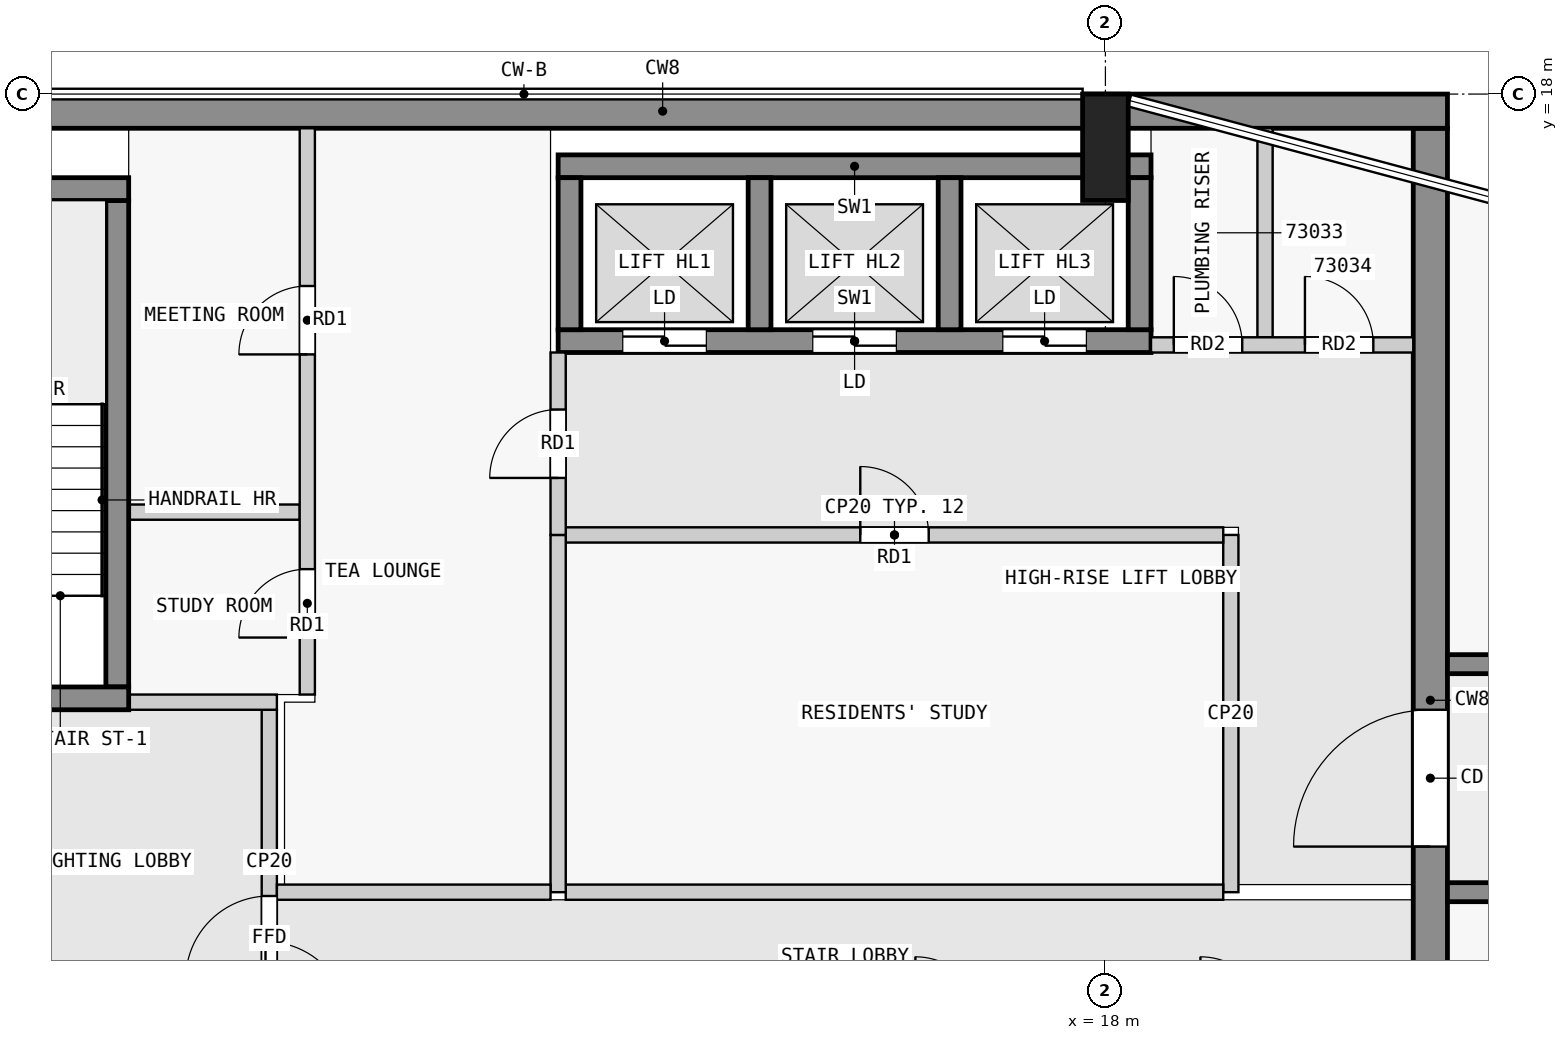
"""IFC4 building model, lengths in metres.
Left out: names, types, materials, properties, quantities, classifications, styles, units other than length and angle.
Written with IfcOpenShell. Run it as: python <this file> out.ifc"""

import sys

from ifc_helpers import new_model, si_unit, direction, frame, frame_2d, origin, origin_2d, place, context, subcontext, project, spatial, rectangle, extrude, element, fill, save


model = new_model("IFC4")
c1 = context("Model", 3, precision=1e-05, world=origin(), true_north=direction((0.0, 1.0)))
c2 = subcontext(c1, "Body", "Model", "MODEL_VIEW")
j1 = project(units=[si_unit("LENGTHUNIT", "METRE"), si_unit("PLANEANGLEUNIT", "RADIAN")], contexts=[c1])
p1 = place(None, origin())
s1 = spatial("IfcSite", under=j1, at=p1, CompositionType="ELEMENT")
p2 = place(p1, origin())
s2 = spatial("IfcBuilding", under=s1, at=p2, CompositionType="ELEMENT")
p3 = place(p2, frame((0.0, 0.0, 277.4)))
s3 = spatial("IfcBuildingStorey", under=s2, at=p3, CompositionType="ELEMENT", Elevation=277.4)
p4 = place(p3, frame((18.0, 17.3, 0.0), z_axis=(0.0, 0.0, 1.0), x_axis=(1.0, 0.0, 0.0)))
e1 = element("IfcColumn", 1, at=p4, inside=s3, PredefinedType="COLUMN", context=c2, shape_type="SweptSolid", body=[
    extrude(rectangle(XDim=0.6, YDim=1.4, at=origin_2d()), origin(), (0.0, 0.0, 1.0), 3.5),
])
p5 = place(p3, frame((1.85, 17.775, 0.0), z_axis=(0.0, 0.0, 1.0), x_axis=(1.0, 0.0, 0.0)))
e2 = element("IfcWall", 2, at=p5, inside=s3, PredefinedType="SHEAR", context=c2, shape_type="SweptSolid", body=[
    extrude(rectangle(XDim=20.65, YDim=0.45, at=frame_2d((10.325, 0.0))), origin(), (0.0, 0.0, 1.0), 3.25),
])
p6 = place(p3, frame((22.275, 2.5, 0.0), z_axis=(0.0, 0.0, 1.0), x_axis=(0.0, 1.0, 0.0)))
e3 = element("IfcWall", 3, at=p6, inside=s3, PredefinedType="SHEAR", context=c2, shape_type="SweptSolid", body=[
    extrude(rectangle(XDim=15.05, YDim=0.45, at=frame_2d((7.525, 0.0))), origin(), (0.0, 0.0, 1.0), 3.25),
])
p7 = place(p6, frame((5.6, 0.0, 0.0)))
e4 = element("IfcOpeningElement", 4, at=p7, cuts=e3, PredefinedType="OPENING", context=c2, shape_type="SweptSolid", body=[
    extrude(rectangle(XDim=1.8, YDim=2.1, at=frame_2d((0.9, 1.05))), frame((0.0, 0.235, 0.0), z_axis=(0.0, -1.0, 0.0), x_axis=(1.0, 0.0, 0.0)), (0.0, 0.0, 1.0), 0.47),
])
p8 = place(p3, frame((2.3, 10.05, 0.0), z_axis=(0.0, 0.0, 1.0), x_axis=(1.0, 0.0, 0.0)))
e5 = element("IfcWall", 5, at=p8, inside=s3, PredefinedType="SHEAR", context=c2, shape_type="SweptSolid", body=[
    extrude(rectangle(XDim=2.85, YDim=0.3, at=frame_2d((1.425, 0.0))), origin(), (0.0, 0.0, 1.0), 3.25),
])
p9 = place(p8, frame((0.25, 0.0, 0.0)))
e6 = element("IfcOpeningElement", 6, at=p9, cuts=e5, PredefinedType="OPENING", context=c2, shape_type="SweptSolid", body=[
    extrude(rectangle(XDim=1.1, YDim=2.1, at=frame_2d((0.55, 1.05))), frame((0.0, 0.16, 0.0), z_axis=(0.0, -1.0, 0.0), x_axis=(1.0, 0.0, 0.0)), (0.0, 0.0, 1.0), 0.32),
])
p10 = place(p3, frame((5.0, 10.2, 0.0), z_axis=(0.0, 0.0, 1.0), x_axis=(0.0, 1.0, 0.0)))
e7 = element("IfcWall", 7, at=p10, inside=s3, PredefinedType="SHEAR", context=c2, shape_type="SweptSolid", body=[
    extrude(rectangle(XDim=6.4, YDim=0.3, at=frame_2d((3.2, 0.0))), origin(), (0.0, 0.0, 1.0), 3.25),
])
p11 = place(p3, frame((2.3, 16.75, 0.0), z_axis=(0.0, 0.0, 1.0), x_axis=(1.0, 0.0, 0.0)))
e8 = element("IfcWall", 8, at=p11, inside=s3, PredefinedType="SHEAR", context=c2, shape_type="SweptSolid", body=[
    extrude(rectangle(XDim=2.85, YDim=0.3, at=frame_2d((1.425, 0.0))), origin(), (0.0, 0.0, 1.0), 3.25),
])
p12 = place(p3, frame((10.8, 17.05, 0.0), z_axis=(0.0, 0.0, 1.0), x_axis=(1.0, 0.0, 0.0)))
e9 = element("IfcWall", 9, at=p12, inside=s3, PredefinedType="SHEAR", context=c2, shape_type="SweptSolid", body=[
    extrude(rectangle(XDim=7.8, YDim=0.3, at=frame_2d((3.9, 0.0))), origin(), (0.0, 0.0, 1.0), 3.25),
])
p13 = place(p3, frame((10.8, 14.75, 0.0), z_axis=(0.0, 0.0, 1.0), x_axis=(1.0, 0.0, 0.0)))
e10 = element("IfcWall", 10, at=p13, inside=s3, PredefinedType="SHEAR", context=c2, shape_type="SweptSolid", body=[
    extrude(rectangle(XDim=7.8, YDim=0.3, at=frame_2d((3.9, 0.0))), origin(), (0.0, 0.0, 1.0), 3.25),
])
p14 = place(p13, frame((0.85, 0.0, 0.0)))
e11 = element("IfcOpeningElement", 11, at=p14, cuts=e10, PredefinedType="OPENING", context=c2, shape_type="SweptSolid", body=[
    extrude(rectangle(XDim=1.1, YDim=2.1, at=frame_2d((0.55, 1.05))), frame((0.0, 0.16, 0.0), z_axis=(0.0, -1.0, 0.0), x_axis=(1.0, 0.0, 0.0)), (0.0, 0.0, 1.0), 0.32),
])
p15 = place(p13, frame((3.35, 0.0, 0.0)))
e12 = element("IfcOpeningElement", 12, at=p15, cuts=e10, PredefinedType="OPENING", context=c2, shape_type="SweptSolid", body=[
    extrude(rectangle(XDim=1.1, YDim=2.1, at=frame_2d((0.55, 1.05))), frame((0.0, 0.16, 0.0), z_axis=(0.0, -1.0, 0.0), x_axis=(1.0, 0.0, 0.0)), (0.0, 0.0, 1.0), 0.32),
])
p16 = place(p13, frame((5.85, 0.0, 0.0)))
e13 = element("IfcOpeningElement", 13, at=p16, cuts=e10, PredefinedType="OPENING", context=c2, shape_type="SweptSolid", body=[
    extrude(rectangle(XDim=1.1, YDim=2.1, at=frame_2d((0.55, 1.05))), frame((0.0, 0.16, 0.0), z_axis=(0.0, -1.0, 0.0), x_axis=(1.0, 0.0, 0.0)), (0.0, 0.0, 1.0), 0.32),
])
for number, where, z_axis, x_axis in (
    (14, (10.95, 14.9, 0.0), (0.0, 0.0, 1.0), (0.0, 1.0, 0.0)),
    (15, (13.45, 14.9, 0.0), (0.0, 0.0, 1.0), (0.0, 1.0, 0.0)),
    (16, (15.95, 14.9, 0.0), (0.0, 0.0, 1.0), (0.0, 1.0, 0.0)),
    (17, (18.45, 14.9, 0.0), (0.0, 0.0, 1.0), (0.0, 1.0, 0.0)),
):
    element("IfcWall", number, at=place(p3, frame(where, z_axis=z_axis, x_axis=x_axis)), inside=s3, PredefinedType="SHEAR", context=c2, shape_type="SweptSolid", body=[
        extrude(rectangle(XDim=2.0, YDim=0.3, at=frame_2d((1.0, 0.0))), origin(), (0.0, 0.0, 1.0), 3.25),
    ])
p17 = place(p3, frame((22.5, 7.5, 0.0), z_axis=(0.0, 0.0, 1.0), x_axis=(1.0, 0.0, 0.0)))
e18 = element("IfcWall", 18, at=p17, inside=s3, PredefinedType="SHEAR", context=c2, shape_type="SweptSolid", body=[
    extrude(rectangle(XDim=22.5, YDim=0.25, at=frame_2d((11.25, 0.0))), origin(), (0.0, 0.0, 1.0), 3.25),
])
p18 = place(p17, frame((1.85, 0.0, 0.0)))
e19 = element("IfcOpeningElement", 19, at=p18, cuts=e18, PredefinedType="OPENING", context=c2, shape_type="SweptSolid", body=[
    extrude(rectangle(XDim=0.9, YDim=2.1, at=frame_2d((0.45, 1.05))), frame((0.0, 0.135, 0.0), z_axis=(0.0, -1.0, 0.0), x_axis=(1.0, 0.0, 0.0)), (0.0, 0.0, 1.0), 0.27),
])
p19 = place(p17, frame((6.25, 0.0, 0.0)))
e20 = element("IfcOpeningElement", 20, at=p19, cuts=e18, PredefinedType="OPENING", context=c2, shape_type="SweptSolid", body=[
    extrude(rectangle(XDim=1.0, YDim=2.1, at=frame_2d((0.5, 1.05))), frame((0.0, 0.135, 0.0), z_axis=(0.0, -1.0, 0.0), x_axis=(1.0, 0.0, 0.0)), (0.0, 0.0, 1.0), 0.27),
])
p20 = place(p17, frame((10.35, 0.0, 0.0)))
e21 = element("IfcOpeningElement", 21, at=p20, cuts=e18, PredefinedType="OPENING", context=c2, shape_type="SweptSolid", body=[
    extrude(rectangle(XDim=1.8, YDim=2.1, at=frame_2d((0.9, 1.05))), frame((0.0, 0.135, 0.0), z_axis=(0.0, -1.0, 0.0), x_axis=(1.0, 0.0, 0.0)), (0.0, 0.0, 1.0), 0.27),
])
p21 = place(p17, frame((16.85, 0.0, 0.0)))
e22 = element("IfcOpeningElement", 22, at=p21, cuts=e18, PredefinedType="OPENING", context=c2, shape_type="SweptSolid", body=[
    extrude(rectangle(XDim=1.0, YDim=2.1, at=frame_2d((0.5, 1.05))), frame((0.0, 0.135, 0.0), z_axis=(0.0, -1.0, 0.0), x_axis=(1.0, 0.0, 0.0)), (0.0, 0.0, 1.0), 0.27),
])
p22 = place(p3, frame((22.5, 10.5, 0.0), z_axis=(0.0, 0.0, 1.0), x_axis=(1.0, 0.0, 0.0)))
e23 = element("IfcWall", 23, at=p22, inside=s3, PredefinedType="SHEAR", context=c2, shape_type="SweptSolid", body=[
    extrude(rectangle(XDim=22.5, YDim=0.25, at=frame_2d((11.25, 0.0))), origin(), (0.0, 0.0, 1.0), 3.25),
])
p23 = place(p22, frame((1.85, 0.0, 0.0)))
e24 = element("IfcOpeningElement", 24, at=p23, cuts=e23, PredefinedType="OPENING", context=c2, shape_type="SweptSolid", body=[
    extrude(rectangle(XDim=0.9, YDim=2.1, at=frame_2d((0.45, 1.05))), frame((0.0, 0.135, 0.0), z_axis=(0.0, -1.0, 0.0), x_axis=(1.0, 0.0, 0.0)), (0.0, 0.0, 1.0), 0.27),
])
p24 = place(p22, frame((10.05, 0.0, 0.0)))
e25 = element("IfcOpeningElement", 25, at=p24, cuts=e23, PredefinedType="OPENING", context=c2, shape_type="SweptSolid", body=[
    extrude(rectangle(XDim=1.0, YDim=2.1, at=frame_2d((0.5, 1.05))), frame((0.0, 0.135, 0.0), z_axis=(0.0, -1.0, 0.0), x_axis=(1.0, 0.0, 0.0)), (0.0, 0.0, 1.0), 0.27),
])
p25 = place(p22, frame((18.75, 0.0, 0.0)))
e26 = element("IfcOpeningElement", 26, at=p25, cuts=e23, PredefinedType="OPENING", context=c2, shape_type="SweptSolid", body=[
    extrude(rectangle(XDim=0.9, YDim=2.1, at=frame_2d((0.45, 1.05))), frame((0.0, 0.135, 0.0), z_axis=(0.0, -1.0, 0.0), x_axis=(1.0, 0.0, 0.0)), (0.0, 0.0, 1.0), 0.27),
])
p26 = place(p22, frame((20.95, 0.0, 0.0)))
e27 = element("IfcOpeningElement", 27, at=p26, cuts=e23, PredefinedType="OPENING", context=c2, shape_type="SweptSolid", body=[
    extrude(rectangle(XDim=1.0, YDim=2.1, at=frame_2d((0.5, 1.05))), frame((0.0, 0.135, 0.0), z_axis=(0.0, -1.0, 0.0), x_axis=(1.0, 0.0, 0.0)), (0.0, 0.0, 1.0), 0.27),
])
p27 = place(p3, frame((7.0, 5.9, 0.0), z_axis=(0.0, 0.0, 1.0), x_axis=(0.0, 1.0, 0.0)))
e28 = element("IfcWall", 28, at=p27, inside=s3, PredefinedType="PARTITIONING", context=c2, shape_type="SweptSolid", body=[
    extrude(rectangle(XDim=4.0, YDim=0.2, at=frame_2d((2.0, 0.0))), origin(), (0.0, 0.0, 1.0), 3.25),
])
p28 = place(p27, frame((0.45, 0.0, 0.0)))
e29 = element("IfcOpeningElement", 29, at=p28, cuts=e28, PredefinedType="OPENING", context=c2, shape_type="SweptSolid", body=[
    extrude(rectangle(XDim=1.1, YDim=2.1, at=frame_2d((0.55, 1.05))), frame((0.0, 0.11, 0.0), z_axis=(0.0, -1.0, 0.0), x_axis=(1.0, 0.0, 0.0)), (0.0, 0.0, 1.0), 0.22),
])
p29 = place(p3, frame((5.15, 10.0, 0.0), z_axis=(0.0, 0.0, 1.0), x_axis=(1.0, 0.0, 0.0)))
e30 = element("IfcWall", 30, at=p29, inside=s3, PredefinedType="PARTITIONING", context=c2, shape_type="SweptSolid", body=[
    extrude(rectangle(XDim=1.95, YDim=0.2, at=frame_2d((0.975, 0.0))), origin(), (0.0, 0.0, 1.0), 3.25),
])
p30 = place(p3, frame((7.1, 7.5, 0.0), z_axis=(0.0, 0.0, 1.0), x_axis=(1.0, 0.0, 0.0)))
e31 = element("IfcWall", 31, at=p30, inside=s3, PredefinedType="PARTITIONING", context=c2, shape_type="SweptSolid", body=[
    extrude(rectangle(XDim=3.6, YDim=0.2, at=frame_2d((1.8, 0.0))), origin(), (0.0, 0.0, 1.0), 3.25),
])
p31 = place(p3, frame((10.8, 12.2, 0.0), z_axis=(0.0, 0.0, 1.0), x_axis=(0.0, 1.0, 0.0)))
e32 = element("IfcWall", 32, at=p31, inside=s3, PredefinedType="PARTITIONING", context=c2, shape_type="SweptSolid", body=[
    extrude(rectangle(XDim=2.4, YDim=0.2, at=frame_2d((1.2, 0.0))), origin(), (0.0, 0.0, 1.0), 3.25),
])
p32 = place(p31, frame((0.75, 0.0, 0.0)))
e33 = element("IfcOpeningElement", 33, at=p32, cuts=e32, PredefinedType="OPENING", context=c2, shape_type="SweptSolid", body=[
    extrude(rectangle(XDim=0.9, YDim=2.1, at=frame_2d((0.45, 1.05))), frame((0.0, 0.11, 0.0), z_axis=(0.0, -1.0, 0.0), x_axis=(1.0, 0.0, 0.0)), (0.0, 0.0, 1.0), 0.22),
])
p33 = place(p3, frame((10.8, 7.5, 0.0), z_axis=(0.0, 0.0, 1.0), x_axis=(0.0, 1.0, 0.0)))
e34 = element("IfcWall", 34, at=p33, inside=s3, PredefinedType="PARTITIONING", context=c2, shape_type="SweptSolid", body=[
    extrude(rectangle(XDim=4.7, YDim=0.2, at=frame_2d((2.35, 0.0))), origin(), (0.0, 0.0, 1.0), 3.25),
])
p34 = place(p3, frame((10.9, 7.5, 0.0), z_axis=(0.0, 0.0, 1.0), x_axis=(1.0, 0.0, 0.0)))
e35 = element("IfcWall", 35, at=p34, inside=s3, PredefinedType="PARTITIONING", context=c2, shape_type="SweptSolid", body=[
    extrude(rectangle(XDim=8.65, YDim=0.2, at=frame_2d((4.325, 0.0))), origin(), (0.0, 0.0, 1.0), 3.25),
])
p35 = place(p3, frame((19.65, 7.5, 0.0), z_axis=(0.0, 0.0, 1.0), x_axis=(0.0, 1.0, 0.0)))
e36 = element("IfcWall", 36, at=p35, inside=s3, PredefinedType="PARTITIONING", context=c2, shape_type="SweptSolid", body=[
    extrude(rectangle(XDim=4.7, YDim=0.2, at=frame_2d((2.35, 0.0))), origin(), (0.0, 0.0, 1.0), 3.25),
])
p36 = place(p3, frame((10.9, 12.2, 0.0), z_axis=(0.0, 0.0, 1.0), x_axis=(1.0, 0.0, 0.0)))
e37 = element("IfcWall", 37, at=p36, inside=s3, PredefinedType="PARTITIONING", context=c2, shape_type="SweptSolid", body=[
    extrude(rectangle(XDim=8.65, YDim=0.2, at=frame_2d((4.325, 0.0))), origin(), (0.0, 0.0, 1.0), 3.25),
])
p37 = place(p36, frame((3.875, 0.0, 0.0)))
e38 = element("IfcOpeningElement", 38, at=p37, cuts=e37, PredefinedType="OPENING", context=c2, shape_type="SweptSolid", body=[
    extrude(rectangle(XDim=0.9, YDim=2.1, at=frame_2d((0.45, 1.05))), frame((0.0, 0.11, 0.0), z_axis=(0.0, -1.0, 0.0), x_axis=(1.0, 0.0, 0.0)), (0.0, 0.0, 1.0), 0.22),
])
p38 = place(p3, frame((7.5, 10.1, 0.0), z_axis=(0.0, 0.0, 1.0), x_axis=(0.0, 1.0, 0.0)))
e39 = element("IfcWall", 39, at=p38, inside=s3, PredefinedType="PARTITIONING", context=c2, shape_type="SweptSolid", body=[
    extrude(rectangle(XDim=7.45, YDim=0.2, at=frame_2d((3.725, 0.0))), origin(), (0.0, 0.0, 1.0), 3.25),
])
p39 = place(p38, frame((0.75, 0.0, 0.0)))
e40 = element("IfcOpeningElement", 40, at=p39, cuts=e39, PredefinedType="OPENING", context=c2, shape_type="SweptSolid", body=[
    extrude(rectangle(XDim=0.9, YDim=2.1, at=frame_2d((0.45, 1.05))), frame((0.0, 0.11, 0.0), z_axis=(0.0, -1.0, 0.0), x_axis=(1.0, 0.0, 0.0)), (0.0, 0.0, 1.0), 0.22),
])
p40 = place(p38, frame((4.475, 0.0, 0.0)))
e41 = element("IfcOpeningElement", 41, at=p40, cuts=e39, PredefinedType="OPENING", context=c2, shape_type="SweptSolid", body=[
    extrude(rectangle(XDim=0.9, YDim=2.1, at=frame_2d((0.45, 1.05))), frame((0.0, 0.11, 0.0), z_axis=(0.0, -1.0, 0.0), x_axis=(1.0, 0.0, 0.0)), (0.0, 0.0, 1.0), 0.22),
])
p41 = place(p3, frame((5.15, 12.5, 0.0), z_axis=(0.0, 0.0, 1.0), x_axis=(1.0, 0.0, 0.0)))
e42 = element("IfcWall", 42, at=p41, inside=s3, PredefinedType="PARTITIONING", context=c2, shape_type="SweptSolid", body=[
    extrude(rectangle(XDim=2.25, YDim=0.2, at=frame_2d((1.125, 0.0))), origin(), (0.0, 0.0, 1.0), 3.25),
])
p42 = place(p3, frame((18.6, 14.7, 0.0), z_axis=(0.0, 0.0, 1.0), x_axis=(1.0, 0.0, 0.0)))
e43 = element("IfcWall", 43, at=p42, inside=s3, PredefinedType="PARTITIONING", context=c2, shape_type="SweptSolid", body=[
    extrude(rectangle(XDim=3.45, YDim=0.2, at=frame_2d((1.725, 0.0))), origin(), (0.0, 0.0, 1.0), 3.25),
])
p43 = place(p42, frame((0.3, 0.0, 0.0)))
e44 = element("IfcOpeningElement", 44, at=p43, cuts=e43, PredefinedType="OPENING", context=c2, shape_type="SweptSolid", body=[
    extrude(rectangle(XDim=0.9, YDim=2.1, at=frame_2d((0.45, 1.05))), frame((0.0, 0.11, 0.0), z_axis=(0.0, -1.0, 0.0), x_axis=(1.0, 0.0, 0.0)), (0.0, 0.0, 1.0), 0.22),
])
p44 = place(p42, frame((2.025, 0.0, 0.0)))
e45 = element("IfcOpeningElement", 45, at=p44, cuts=e43, PredefinedType="OPENING", context=c2, shape_type="SweptSolid", body=[
    extrude(rectangle(XDim=0.9, YDim=2.1, at=frame_2d((0.45, 1.05))), frame((0.0, 0.11, 0.0), z_axis=(0.0, -1.0, 0.0), x_axis=(1.0, 0.0, 0.0)), (0.0, 0.0, 1.0), 0.22),
])
p45 = place(p3, frame((20.1, 14.8, 0.0), z_axis=(0.0, 0.0, 1.0), x_axis=(0.0, 1.0, 0.0)))
e46 = element("IfcWall", 46, at=p45, inside=s3, PredefinedType="PARTITIONING", context=c2, shape_type="SweptSolid", body=[
    extrude(rectangle(XDim=2.75, YDim=0.2, at=frame_2d((1.375, 0.0))), origin(), (0.0, 0.0, 1.0), 3.25),
])
p46 = place(p28, origin())
e47 = element("IfcDoor", 47, at=p46, inside=s3, OperationType="SINGLE_SWING_LEFT", PredefinedType="DOOR", context=c2, shape_type="SweptSolid", body=[
    extrude(rectangle(XDim=1.1, YDim=2.1, at=frame_2d((0.55, 1.05))), frame((0.0, 0.025, 0.0), z_axis=(0.0, -1.0, 0.0), x_axis=(1.0, 0.0, 0.0)), (0.0, 0.0, 1.0), 0.05),
])
fill(e29, e47)
p47 = place(p32, origin())
e48 = element("IfcDoor", 48, at=p47, inside=s3, OperationType="SINGLE_SWING_LEFT", PredefinedType="DOOR", context=c2, shape_type="SweptSolid", body=[
    extrude(rectangle(XDim=0.9, YDim=2.1, at=frame_2d((0.45, 1.05))), frame((0.0, 0.025, 0.0), z_axis=(0.0, -1.0, 0.0), x_axis=(1.0, 0.0, 0.0)), (0.0, 0.0, 1.0), 0.05),
])
fill(e33, e48)
p48 = place(p37, origin())
e49 = element("IfcDoor", 49, at=p48, inside=s3, OperationType="SINGLE_SWING_LEFT", PredefinedType="DOOR", context=c2, shape_type="SweptSolid", body=[
    extrude(rectangle(XDim=0.9, YDim=2.1, at=frame_2d((0.45, 1.05))), frame((0.0, 0.025, 0.0), z_axis=(0.0, -1.0, 0.0), x_axis=(1.0, 0.0, 0.0)), (0.0, 0.0, 1.0), 0.05),
])
fill(e38, e49)
p49 = place(p14, origin())
e50 = element("IfcDoor", 50, at=p49, inside=s3, OperationType="DOUBLE_DOOR_SLIDING", PredefinedType="DOOR", context=c2, shape_type="SweptSolid", body=[
    extrude(rectangle(XDim=1.1, YDim=2.1, at=frame_2d((0.55, 1.05))), frame((0.0, 0.025, 0.0), z_axis=(0.0, -1.0, 0.0), x_axis=(1.0, 0.0, 0.0)), (0.0, 0.0, 1.0), 0.05),
])
fill(e11, e50)
p50 = place(p15, origin())
e51 = element("IfcDoor", 51, at=p50, inside=s3, OperationType="DOUBLE_DOOR_SLIDING", PredefinedType="DOOR", context=c2, shape_type="SweptSolid", body=[
    extrude(rectangle(XDim=1.1, YDim=2.1, at=frame_2d((0.55, 1.05))), frame((0.0, 0.025, 0.0), z_axis=(0.0, -1.0, 0.0), x_axis=(1.0, 0.0, 0.0)), (0.0, 0.0, 1.0), 0.05),
])
fill(e12, e51)
p51 = place(p16, origin())
e52 = element("IfcDoor", 52, at=p51, inside=s3, OperationType="DOUBLE_DOOR_SLIDING", PredefinedType="DOOR", context=c2, shape_type="SweptSolid", body=[
    extrude(rectangle(XDim=1.1, YDim=2.1, at=frame_2d((0.55, 1.05))), frame((0.0, 0.025, 0.0), z_axis=(0.0, -1.0, 0.0), x_axis=(1.0, 0.0, 0.0)), (0.0, 0.0, 1.0), 0.05),
])
fill(e13, e52)
p52 = place(p7, origin())
e53 = element("IfcDoor", 53, at=p52, inside=s3, OperationType="DOUBLE_DOOR_SINGLE_SWING", PredefinedType="DOOR", context=c2, shape_type="SweptSolid", body=[
    extrude(rectangle(XDim=1.8, YDim=2.1, at=frame_2d((0.9, 1.05))), frame((0.0, 0.025, 0.0), z_axis=(0.0, -1.0, 0.0), x_axis=(1.0, 0.0, 0.0)), (0.0, 0.0, 1.0), 0.05),
])
fill(e4, e53)
p53 = place(p39, origin())
e54 = element("IfcDoor", 54, at=p53, inside=s3, OperationType="SINGLE_SWING_RIGHT", PredefinedType="DOOR", context=c2, shape_type="SweptSolid", body=[
    extrude(rectangle(XDim=0.9, YDim=2.1, at=frame_2d((0.45, 1.05))), frame((0.0, 0.025, 0.0), z_axis=(0.0, -1.0, 0.0), x_axis=(1.0, 0.0, 0.0)), (0.0, 0.0, 1.0), 0.05),
])
fill(e40, e54)
p54 = place(p40, origin())
e55 = element("IfcDoor", 55, at=p54, inside=s3, OperationType="SINGLE_SWING_RIGHT", PredefinedType="DOOR", context=c2, shape_type="SweptSolid", body=[
    extrude(rectangle(XDim=0.9, YDim=2.1, at=frame_2d((0.45, 1.05))), frame((0.0, 0.025, 0.0), z_axis=(0.0, -1.0, 0.0), x_axis=(1.0, 0.0, 0.0)), (0.0, 0.0, 1.0), 0.05),
])
fill(e41, e55)
p55 = place(p43, origin())
e56 = element("IfcDoor", 56, at=p55, inside=s3, OperationType="SINGLE_SWING_LEFT", PredefinedType="DOOR", context=c2, shape_type="SweptSolid", body=[
    extrude(rectangle(XDim=0.9, YDim=2.1, at=frame_2d((0.45, 1.05))), frame((0.0, 0.025, 0.0), z_axis=(0.0, -1.0, 0.0), x_axis=(1.0, 0.0, 0.0)), (0.0, 0.0, 1.0), 0.05),
])
fill(e44, e56)
p56 = place(p44, origin())
e57 = element("IfcDoor", 57, at=p56, inside=s3, OperationType="SINGLE_SWING_LEFT", PredefinedType="DOOR", context=c2, shape_type="SweptSolid", body=[
    extrude(rectangle(XDim=0.9, YDim=2.1, at=frame_2d((0.45, 1.05))), frame((0.0, 0.025, 0.0), z_axis=(0.0, -1.0, 0.0), x_axis=(1.0, 0.0, 0.0)), (0.0, 0.0, 1.0), 0.05),
])
fill(e45, e57)
save(model, sys.argv[1])
